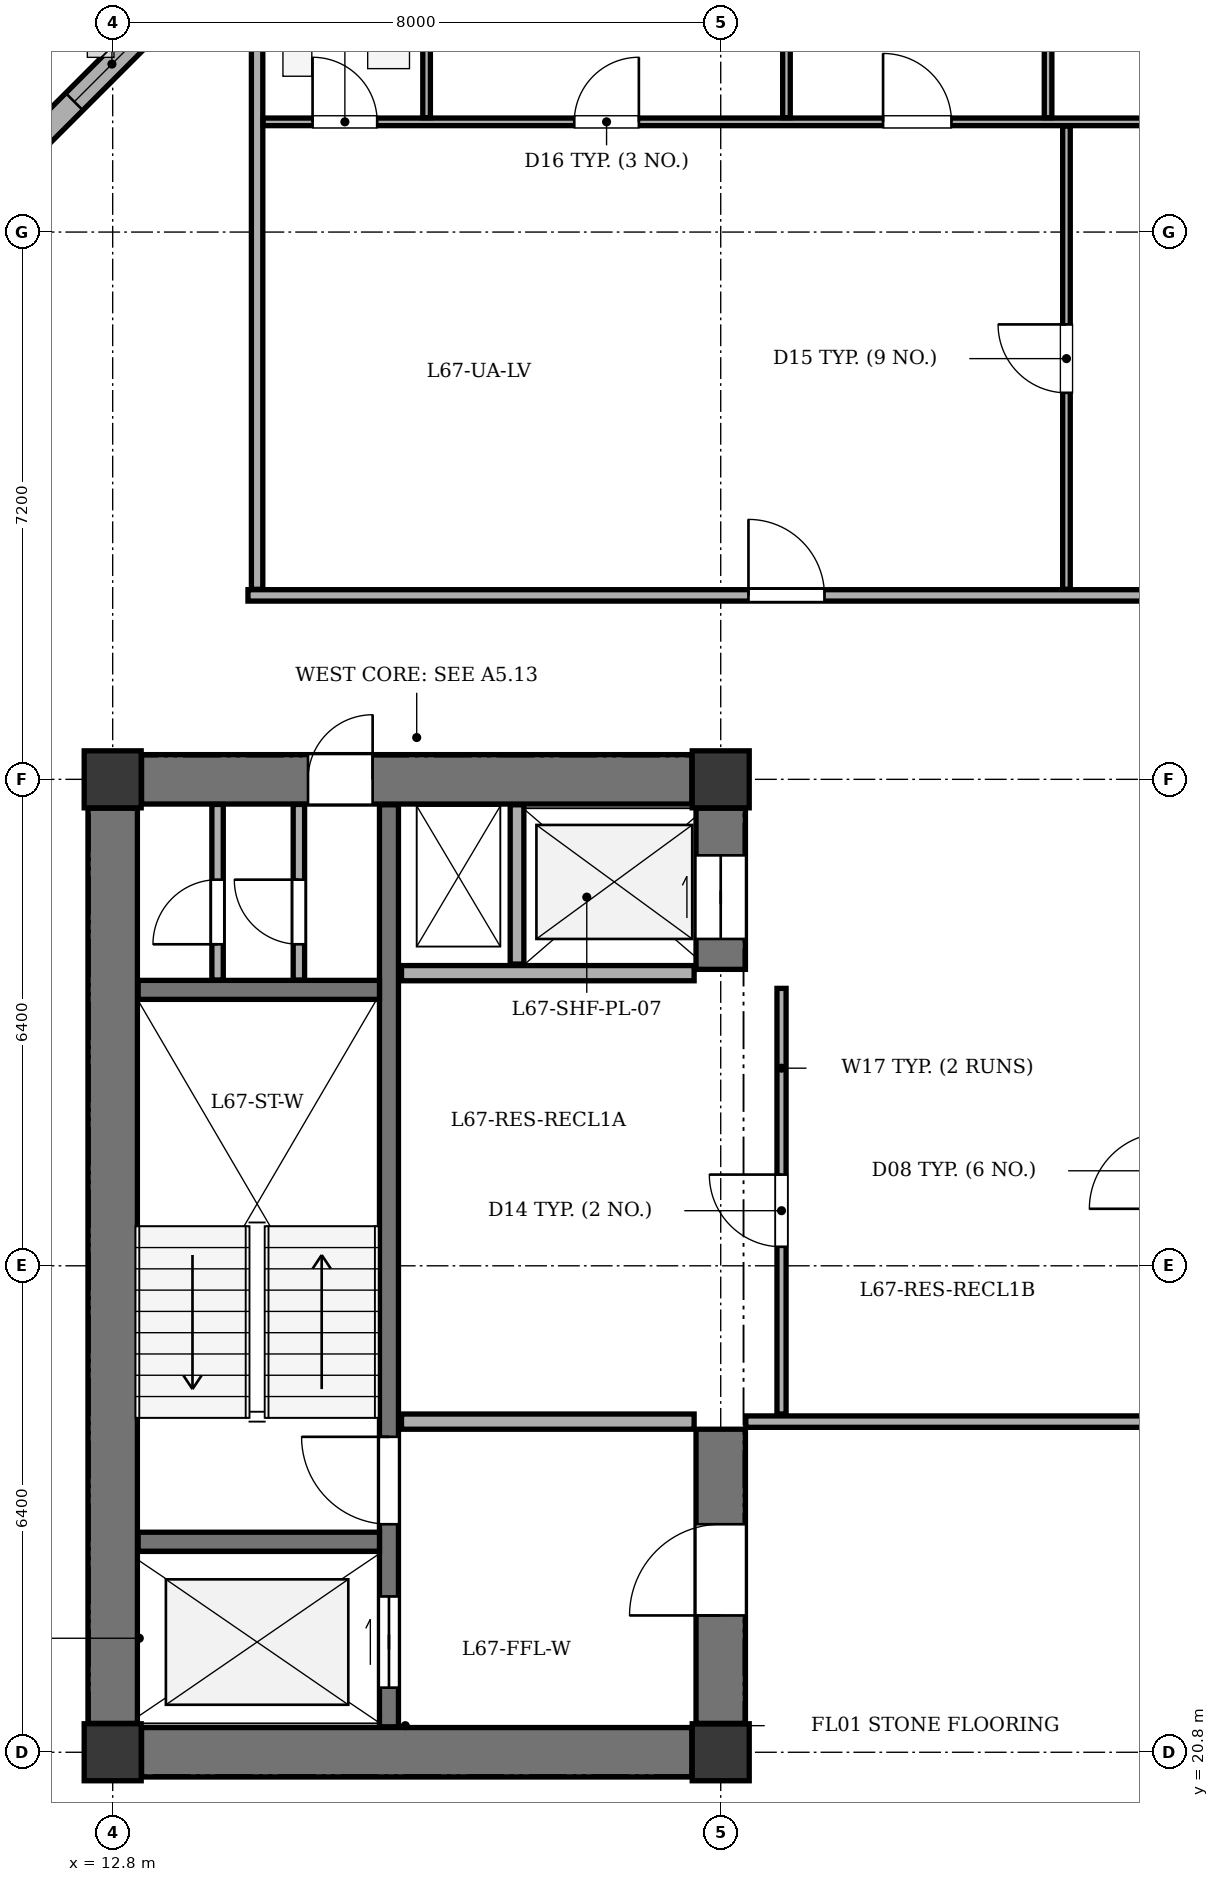
"""IFC4 building model, lengths in metres.
Left out: names, types, materials, properties, quantities, classifications, styles, units other than length and angle.
Written with IfcOpenShell. Run it as: python <this file> out.ifc"""

import sys

from ifc_helpers import new_model, si_unit, direction, frame, frame_2d, origin, origin_2d, place, context, subcontext, project, spatial, rectangle, extrude, element, fill, save


model = new_model("IFC4")
c1 = context("Model", 3, precision=1e-05, world=origin(), true_north=direction((0.0, 1.0)))
c2 = subcontext(c1, "Body", "Model", "MODEL_VIEW")
j1 = project(units=[si_unit("LENGTHUNIT", "METRE"), si_unit("PLANEANGLEUNIT", "RADIAN")], contexts=[c1])
p1 = place(None, origin())
s1 = spatial("IfcSite", under=j1, at=p1, CompositionType="ELEMENT")
p2 = place(p1, origin())
s2 = spatial("IfcBuilding", under=s1, at=p2, CompositionType="ELEMENT")
p3 = place(p2, frame((0.0, 0.0, 255.1)))
s3 = spatial("IfcBuildingStorey", under=s2, at=p3, CompositionType="ELEMENT", Elevation=255.1)
for number, where, z_axis, x_axis in (
    (1, (12.8, 20.8, 0.0), (0.0, 0.0, 1.0), (1.0, 0.0, 0.0)),
    (2, (20.8, 20.8, 0.0), (0.0, 0.0, 1.0), (1.0, 0.0, 0.0)),
    (3, (12.8, 33.6, 0.0), (0.0, 0.0, 1.0), (1.0, 0.0, 0.0)),
    (4, (20.8, 33.6, 0.0), (0.0, 0.0, 1.0), (1.0, 0.0, 0.0)),
):
    element("IfcColumn", number, at=place(p3, frame(where, z_axis=z_axis, x_axis=x_axis)), inside=s3, PredefinedType="COLUMN", context=c2, shape_type="SweptSolid", body=[
        extrude(rectangle(XDim=0.75, YDim=0.75, at=origin_2d()), origin(), (0.0, 0.0, 1.0), 3.4),
    ])
p4 = place(p3, frame((10.88, 41.1, 0.0), z_axis=(0.0, 0.0, 1.0), x_axis=(0.70712937715, 0.707084184501, 0.0)))
e5 = element("IfcWall", 5, at=p4, inside=s3, PredefinedType="STANDARD", context=c2, shape_type="SweptSolid", body=[
    extrude(rectangle(XDim=5.402, YDim=0.32, at=frame_2d((2.701, 0.0))), origin(), (0.0, 0.0, 1.0), 2.725),
])
p5 = place(p4, frame((2.001, 0.0, 0.75)))
e6 = element("IfcOpeningElement", 6, at=p5, cuts=e5, PredefinedType="OPENING", context=c2, shape_type="SweptSolid", body=[
    extrude(rectangle(XDim=1.4, YDim=1.65, at=frame_2d((0.7, 0.825))), frame((0.0, 0.17, 0.0), z_axis=(0.0, -1.0, 0.0), x_axis=(1.0, 0.0, 0.0)), (0.0, 0.0, 1.0), 0.34),
])
p6 = place(p3, frame((12.8, 21.18, 0.0), z_axis=(0.0, 0.0, 1.0), x_axis=(0.0, 1.0, 0.0)))
e7 = element("IfcWall", 7, at=p6, inside=s3, PredefinedType="SHEAR", context=c2, shape_type="SweptSolid", body=[
    extrude(rectangle(XDim=12.04, YDim=0.65, at=frame_2d((6.02, 0.0))), origin(), (0.0, 0.0, 1.0), 3.1),
])
p7 = place(p3, frame((13.18, 20.8, 0.0), z_axis=(0.0, 0.0, 1.0), x_axis=(1.0, 0.0, 0.0)))
e8 = element("IfcWall", 8, at=p7, inside=s3, PredefinedType="SHEAR", context=c2, shape_type="SweptSolid", body=[
    extrude(rectangle(XDim=7.24, YDim=0.65, at=frame_2d((3.62, 0.0))), origin(), (0.0, 0.0, 1.0), 3.1),
])
p8 = place(p3, frame((13.18, 33.6, 0.0), z_axis=(0.0, 0.0, 1.0), x_axis=(1.0, 0.0, 0.0)))
e9 = element("IfcWall", 9, at=p8, inside=s3, PredefinedType="SHEAR", context=c2, shape_type="SweptSolid", body=[
    extrude(rectangle(XDim=7.24, YDim=0.65, at=frame_2d((3.62, 0.0))), origin(), (0.0, 0.0, 1.0), 3.1),
])
p9 = place(p8, frame((2.19, 0.0, 0.0)))
e10 = element("IfcOpeningElement", 10, at=p9, cuts=e9, PredefinedType="OPENING", context=c2, shape_type="SweptSolid", body=[
    extrude(rectangle(XDim=0.85, YDim=2.02, at=frame_2d((0.425, 1.01))), frame((0.0, 0.335, 0.0), z_axis=(0.0, -1.0, 0.0), x_axis=(1.0, 0.0, 0.0)), (0.0, 0.0, 1.0), 0.67),
])
p10 = place(p3, frame((20.8, 21.18, 0.0), z_axis=(0.0, 0.0, 1.0), x_axis=(0.0, 1.0, 0.0)))
e11 = element("IfcWall", 11, at=p10, inside=s3, PredefinedType="SHEAR", context=c2, shape_type="SweptSolid", body=[
    extrude(rectangle(XDim=3.87, YDim=0.65, at=frame_2d((1.935, 0.0))), origin(), (0.0, 0.0, 1.0), 3.1),
])
p11 = place(p10, frame((1.42, 0.0, 0.0)))
e12 = element("IfcOpeningElement", 12, at=p11, cuts=e11, PredefinedType="OPENING", context=c2, shape_type="SweptSolid", body=[
    extrude(rectangle(XDim=1.2, YDim=2.15, at=frame_2d((0.6, 1.075))), frame((0.0, 0.335, 0.0), z_axis=(0.0, -1.0, 0.0), x_axis=(1.0, 0.0, 0.0)), (0.0, 0.0, 1.0), 0.67),
])
p12 = place(p3, frame((20.8, 31.1, 0.0), z_axis=(0.0, 0.0, 1.0), x_axis=(0.0, 1.0, 0.0)))
e13 = element("IfcWall", 13, at=p12, inside=s3, PredefinedType="SHEAR", context=c2, shape_type="SweptSolid", body=[
    extrude(rectangle(XDim=2.12, YDim=0.65, at=frame_2d((1.06, 0.0))), origin(), (0.0, 0.0, 1.0), 3.1),
])
p13 = place(p12, frame((0.4, 0.0, 0.0)))
e14 = element("IfcOpeningElement", 14, at=p13, cuts=e13, PredefinedType="OPENING", context=c2, shape_type="SweptSolid", body=[
    extrude(rectangle(XDim=1.1, YDim=2.1, at=frame_2d((0.55, 1.05))), frame((0.0, 0.335, 0.0), z_axis=(0.0, -1.0, 0.0), x_axis=(1.0, 0.0, 0.0)), (0.0, 0.0, 1.0), 0.67),
])
p14 = place(p3, frame((16.435, 21.135, 0.0), z_axis=(0.0, 0.0, 1.0), x_axis=(0.0, 1.0, 0.0)))
e15 = element("IfcWall", 15, at=p14, inside=s3, PredefinedType="SHEAR", context=c2, shape_type="SweptSolid", body=[
    extrude(rectangle(XDim=12.13, YDim=0.25, at=frame_2d((6.065, 0.0))), origin(), (0.0, 0.0, 1.0), 3.1),
])
p15 = place(p14, frame((0.515, 0.0, 0.0)))
e16 = element("IfcOpeningElement", 16, at=p15, cuts=e15, PredefinedType="OPENING", context=c2, shape_type="SweptSolid", body=[
    extrude(rectangle(XDim=1.2, YDim=2.15, at=frame_2d((0.6, 1.075))), frame((0.0, 0.135, 0.0), z_axis=(0.0, -1.0, 0.0), x_axis=(1.0, 0.0, 0.0)), (0.0, 0.0, 1.0), 0.27),
])
p16 = place(p14, frame((2.665, 0.0, 0.0)))
e17 = element("IfcOpeningElement", 17, at=p16, cuts=e15, PredefinedType="OPENING", context=c2, shape_type="SweptSolid", body=[
    extrude(rectangle(XDim=1.15, YDim=2.15, at=frame_2d((0.575, 1.075))), frame((0.0, 0.135, 0.0), z_axis=(0.0, -1.0, 0.0), x_axis=(1.0, 0.0, 0.0)), (0.0, 0.0, 1.0), 0.27),
])
for number, where, z_axis, x_axis in (
    (18, (13.135, 23.57, 0.0), (0.0, 0.0, 1.0), (1.0, 0.0, 0.0)),
    (19, (13.135, 30.83, 0.0), (0.0, 0.0, 1.0), (1.0, 0.0, 0.0)),
):
    element("IfcWall", number, at=place(p3, frame(where, z_axis=z_axis, x_axis=x_axis)), inside=s3, PredefinedType="SHEAR", context=c2, shape_type="SweptSolid", body=[
        extrude(rectangle(XDim=3.175, YDim=0.25, at=frame_2d((1.587, 0.0))), origin(), (0.0, 0.0, 1.0), 3.1),
    ])
for number, where, z_axis, x_axis in (
    (20, (16.6, 25.15, 0.0), (0.0, 0.0, 1.0), (1.0, 0.0, 0.0)),
    (21, (16.6, 31.05, 0.0), (0.0, 0.0, 1.0), (1.0, 0.0, 0.0)),
):
    element("IfcWall", number, at=place(p3, frame(where, z_axis=z_axis, x_axis=x_axis)), inside=s3, PredefinedType="SOLIDWALL", context=c2, shape_type="SweptSolid", body=[
        extrude(rectangle(XDim=3.85, YDim=0.2, at=frame_2d((1.925, 0.0))), origin(), (0.0, 0.0, 1.0), 3.1),
    ])
p17 = place(p3, frame((18.12, 31.17, 0.0), z_axis=(0.0, 0.0, 1.0), x_axis=(0.0, 1.0, 0.0)))
e22 = element("IfcWall", 22, at=p17, inside=s3, PredefinedType="PARTITIONING", context=c2, shape_type="SweptSolid", body=[
    extrude(rectangle(XDim=2.095, YDim=0.18, at=frame_2d((1.047, 0.0))), origin(), (0.0, 0.0, 1.0), 3.1),
])
p18 = place(p3, frame((14.18, 30.96, 0.0), z_axis=(0.0, 0.0, 1.0), x_axis=(0.0, 1.0, 0.0)))
e23 = element("IfcWall", 23, at=p18, inside=s3, PredefinedType="PARTITIONING", context=c2, shape_type="SweptSolid", body=[
    extrude(rectangle(XDim=2.31, YDim=0.15, at=frame_2d((1.155, 0.0))), origin(), (0.0, 0.0, 1.0), 3.1),
])
p19 = place(p18, frame((0.47, 0.0, 0.0)))
e24 = element("IfcOpeningElement", 24, at=p19, cuts=e23, PredefinedType="OPENING", context=c2, shape_type="SweptSolid", body=[
    extrude(rectangle(XDim=0.85, YDim=2.02, at=frame_2d((0.425, 1.01))), frame((0.0, 0.085, 0.0), z_axis=(0.0, -1.0, 0.0), x_axis=(1.0, 0.0, 0.0)), (0.0, 0.0, 1.0), 0.17),
])
p20 = place(p3, frame((15.25, 30.96, 0.0), z_axis=(0.0, 0.0, 1.0), x_axis=(0.0, 1.0, 0.0)))
e25 = element("IfcWall", 25, at=p20, inside=s3, PredefinedType="PARTITIONING", context=c2, shape_type="SweptSolid", body=[
    extrude(rectangle(XDim=2.31, YDim=0.15, at=frame_2d((1.155, 0.0))), origin(), (0.0, 0.0, 1.0), 3.1),
])
p21 = place(p20, frame((0.47, 0.0, 0.0)))
e26 = element("IfcOpeningElement", 26, at=p21, cuts=e25, PredefinedType="OPENING", context=c2, shape_type="SweptSolid", body=[
    extrude(rectangle(XDim=0.85, YDim=2.02, at=frame_2d((0.425, 1.01))), frame((0.0, 0.085, 0.0), z_axis=(0.0, -1.0, 0.0), x_axis=(1.0, 0.0, 0.0)), (0.0, 0.0, 1.0), 0.17),
])
p22 = place(p3, frame((21.13, 25.15, 0.0), z_axis=(0.0, 0.0, 1.0), x_axis=(1.0, 0.0, 0.0)))
e27 = element("IfcWall", 27, at=p22, inside=s3, PredefinedType="PARTITIONING", context=c2, shape_type="SweptSolid", body=[
    extrude(rectangle(XDim=5.52, YDim=0.15, at=frame_2d((2.76, 0.0))), origin(), (0.0, 0.0, 1.0), 3.1),
])
p23 = place(p3, frame((21.6, 25.25, 0.0), z_axis=(0.0, 0.0, 1.0), x_axis=(0.0, 1.0, 0.0)))
e28 = element("IfcWall", 28, at=p23, inside=s3, PredefinedType="PARTITIONING", context=c2, shape_type="SweptSolid", body=[
    extrude(rectangle(XDim=5.6, YDim=0.12, at=frame_2d((2.8, 0.0))), origin(), (0.0, 0.0, 1.0), 3.1),
])
p24 = place(p23, frame((2.2, 0.0, 0.0)))
e29 = element("IfcOpeningElement", 29, at=p24, cuts=e28, PredefinedType="OPENING", context=c2, shape_type="SweptSolid", body=[
    extrude(rectangle(XDim=0.95, YDim=2.1, at=frame_2d((0.475, 1.05))), frame((0.0, 0.07, 0.0), z_axis=(0.0, -1.0, 0.0), x_axis=(1.0, 0.0, 0.0)), (0.0, 0.0, 1.0), 0.14),
])
p25 = place(p3, frame((14.58, 36.02, 0.0), z_axis=(0.0, 0.0, 1.0), x_axis=(1.0, 0.0, 0.0)))
e30 = element("IfcWall", 30, at=p25, inside=s3, PredefinedType="PARTITIONING", context=c2, shape_type="SweptSolid", body=[
    extrude(rectangle(XDim=30.52, YDim=0.15, at=frame_2d((15.26, 0.0))), origin(), (0.0, 0.0, 1.0), 3.1),
])
p26 = place(p25, frame((6.585, 0.0, 0.0)))
e31 = element("IfcOpeningElement", 31, at=p26, cuts=e30, PredefinedType="OPENING", context=c2, shape_type="SweptSolid", body=[
    extrude(rectangle(XDim=1.0, YDim=2.1, at=frame_2d((0.5, 1.05))), frame((0.0, 0.085, 0.0), z_axis=(0.0, -1.0, 0.0), x_axis=(1.0, 0.0, 0.0)), (0.0, 0.0, 1.0), 0.17),
])
p27 = place(p25, frame((21.724, 0.0, 0.0)))
e32 = element("IfcOpeningElement", 32, at=p27, cuts=e30, PredefinedType="OPENING", context=c2, shape_type="SweptSolid", body=[
    extrude(rectangle(XDim=1.0, YDim=2.1, at=frame_2d((0.5, 1.05))), frame((0.0, 0.085, 0.0), z_axis=(0.0, -1.0, 0.0), x_axis=(1.0, 0.0, 0.0)), (0.0, 0.0, 1.0), 0.17),
])
p28 = place(p3, frame((14.7, 36.1, 0.0), z_axis=(0.0, 0.0, 1.0), x_axis=(0.0, 1.0, 0.0)))
e33 = element("IfcWall", 33, at=p28, inside=s3, PredefinedType="PARTITIONING", context=c2, shape_type="SweptSolid", body=[
    extrude(rectangle(XDim=8.655, YDim=0.15, at=frame_2d((4.327, 0.0))), origin(), (0.0, 0.0, 1.0), 3.1),
])
p29 = place(p3, frame((14.78, 42.25, 0.0), z_axis=(0.0, 0.0, 1.0), x_axis=(1.0, 0.0, 0.0)))
e34 = element("IfcWall", 34, at=p29, inside=s3, PredefinedType="PARTITIONING", context=c2, shape_type="SweptSolid", body=[
    extrude(rectangle(XDim=13.889, YDim=0.1, at=frame_2d((6.944, 0.0))), origin(), (0.0, 0.0, 1.0), 3.1),
])
p30 = place(p29, frame((0.65, 0.0, 0.0)))
e35 = element("IfcOpeningElement", 35, at=p30, cuts=e34, PredefinedType="OPENING", context=c2, shape_type="SweptSolid", body=[
    extrude(rectangle(XDim=0.85, YDim=2.05, at=frame_2d((0.425, 1.025))), frame((0.0, 0.06, 0.0), z_axis=(0.0, -1.0, 0.0), x_axis=(1.0, 0.0, 0.0)), (0.0, 0.0, 1.0), 0.12),
])
p31 = place(p29, frame((4.093, 0.0, 0.0)))
e36 = element("IfcOpeningElement", 36, at=p31, cuts=e34, PredefinedType="OPENING", context=c2, shape_type="SweptSolid", body=[
    extrude(rectangle(XDim=0.85, YDim=2.05, at=frame_2d((0.425, 1.025))), frame((0.0, 0.06, 0.0), z_axis=(0.0, -1.0, 0.0), x_axis=(1.0, 0.0, 0.0)), (0.0, 0.0, 1.0), 0.12),
])
p32 = place(p29, frame((8.156, 0.0, 0.0)))
e37 = element("IfcOpeningElement", 37, at=p32, cuts=e34, PredefinedType="OPENING", context=c2, shape_type="SweptSolid", body=[
    extrude(rectangle(XDim=0.9, YDim=2.05, at=frame_2d((0.45, 1.025))), frame((0.0, 0.06, 0.0), z_axis=(0.0, -1.0, 0.0), x_axis=(1.0, 0.0, 0.0)), (0.0, 0.0, 1.0), 0.12),
])
p33 = place(p29, frame((11.598, 0.0, 0.0)))
e38 = element("IfcOpeningElement", 38, at=p33, cuts=e34, PredefinedType="OPENING", context=c2, shape_type="SweptSolid", body=[
    extrude(rectangle(XDim=0.9, YDim=2.05, at=frame_2d((0.45, 1.025))), frame((0.0, 0.06, 0.0), z_axis=(0.0, -1.0, 0.0), x_axis=(1.0, 0.0, 0.0)), (0.0, 0.0, 1.0), 0.12),
])
p34 = place(p3, frame((25.349, 36.1, 0.0), z_axis=(0.0, 0.0, 1.0), x_axis=(0.0, 1.0, 0.0)))
e39 = element("IfcWall", 39, at=p34, inside=s3, PredefinedType="PARTITIONING", context=c2, shape_type="SweptSolid", body=[
    extrude(rectangle(XDim=6.095, YDim=0.1, at=frame_2d((3.047, 0.0))), origin(), (0.0, 0.0, 1.0), 3.1),
])
p35 = place(p34, frame((2.585, 0.0, 0.0)))
e40 = element("IfcOpeningElement", 40, at=p35, cuts=e39, PredefinedType="OPENING", context=c2, shape_type="SweptSolid", body=[
    extrude(rectangle(XDim=0.9, YDim=2.05, at=frame_2d((0.45, 1.025))), frame((0.0, 0.06, 0.0), z_axis=(0.0, -1.0, 0.0), x_axis=(1.0, 0.0, 0.0)), (0.0, 0.0, 1.0), 0.12),
])
for number, where, z_axis, x_axis in (
    (41, (16.93, 42.305, 0.0), (0.0, 0.0, 1.0), (0.0, 1.0, 0.0)),
    (42, (21.665, 42.305, 0.0), (0.0, 0.0, 1.0), (0.0, 1.0, 0.0)),
    (43, (25.107, 42.305, 0.0), (0.0, 0.0, 1.0), (0.0, 1.0, 0.0)),
):
    element("IfcWall", number, at=place(p3, frame(where, z_axis=z_axis, x_axis=x_axis)), inside=s3, PredefinedType="PARTITIONING", context=c2, shape_type="SweptSolid", body=[
        extrude(rectangle(XDim=2.45, YDim=0.1, at=frame_2d((1.225, 0.0))), origin(), (0.0, 0.0, 1.0), 3.1),
    ])
p36 = place(p5, origin())
e44 = element("IfcWindow", 44, at=p36, inside=s3, PartitioningType="SINGLE_PANEL", PredefinedType="WINDOW", context=c2, shape_type="SweptSolid", body=[
    extrude(rectangle(XDim=1.4, YDim=1.65, at=frame_2d((0.7, 0.825))), frame((0.0, -0.01, 0.0), z_axis=(0.0, -1.0, 0.0), x_axis=(1.0, 0.0, 0.0)), (0.0, 0.0, 1.0), 0.06),
])
fill(e6, e44)
p37 = place(p9, origin())
e45 = element("IfcDoor", 45, at=p37, inside=s3, OperationType="SINGLE_SWING_RIGHT", PredefinedType="DOOR", context=c2, shape_type="SweptSolid", body=[
    extrude(rectangle(XDim=0.85, YDim=2.02, at=frame_2d((0.425, 1.01))), frame((0.0, 0.025, 0.0), z_axis=(0.0, -1.0, 0.0), x_axis=(1.0, 0.0, 0.0)), (0.0, 0.0, 1.0), 0.05),
])
fill(e10, e45)
p38 = place(p11, origin())
e46 = element("IfcDoor", 46, at=p38, inside=s3, OperationType="SINGLE_SWING_LEFT", PredefinedType="DOOR", context=c2, shape_type="SweptSolid", body=[
    extrude(rectangle(XDim=1.2, YDim=2.15, at=frame_2d((0.6, 1.075))), frame((0.0, 0.025, 0.0), z_axis=(0.0, -1.0, 0.0), x_axis=(1.0, 0.0, 0.0)), (0.0, 0.0, 1.0), 0.05),
])
fill(e12, e46)
p39 = place(p13, origin())
e47 = element("IfcDoor", 47, at=p39, inside=s3, OperationType="DOUBLE_DOOR_SLIDING", PredefinedType="DOOR", context=c2, shape_type="SweptSolid", body=[
    extrude(rectangle(XDim=1.1, YDim=2.1, at=frame_2d((0.55, 1.05))), frame((0.0, 0.025, 0.0), z_axis=(0.0, -1.0, 0.0), x_axis=(1.0, 0.0, 0.0)), (0.0, 0.0, 1.0), 0.05),
])
fill(e14, e47)
p40 = place(p15, origin())
e48 = element("IfcDoor", 48, at=p40, inside=s3, OperationType="DOUBLE_DOOR_SLIDING", PredefinedType="DOOR", context=c2, shape_type="SweptSolid", body=[
    extrude(rectangle(XDim=1.2, YDim=2.15, at=frame_2d((0.6, 1.075))), frame((0.0, 0.025, 0.0), z_axis=(0.0, -1.0, 0.0), x_axis=(1.0, 0.0, 0.0)), (0.0, 0.0, 1.0), 0.05),
])
fill(e16, e48)
p41 = place(p16, origin())
e49 = element("IfcDoor", 49, at=p41, inside=s3, OperationType="SINGLE_SWING_RIGHT", PredefinedType="DOOR", context=c2, shape_type="SweptSolid", body=[
    extrude(rectangle(XDim=1.15, YDim=2.15, at=frame_2d((0.575, 1.075))), frame((0.0, 0.025, 0.0), z_axis=(0.0, -1.0, 0.0), x_axis=(1.0, 0.0, 0.0)), (0.0, 0.0, 1.0), 0.05),
])
fill(e17, e49)
p42 = place(p19, origin())
e50 = element("IfcDoor", 50, at=p42, inside=s3, OperationType="SINGLE_SWING_LEFT", PredefinedType="DOOR", context=c2, shape_type="SweptSolid", body=[
    extrude(rectangle(XDim=0.85, YDim=2.02, at=frame_2d((0.425, 1.01))), frame((0.0, 0.025, 0.0), z_axis=(0.0, -1.0, 0.0), x_axis=(1.0, 0.0, 0.0)), (0.0, 0.0, 1.0), 0.05),
])
fill(e24, e50)
p43 = place(p21, origin())
e51 = element("IfcDoor", 51, at=p43, inside=s3, OperationType="SINGLE_SWING_RIGHT", PredefinedType="DOOR", context=c2, shape_type="SweptSolid", body=[
    extrude(rectangle(XDim=0.85, YDim=2.02, at=frame_2d((0.425, 1.01))), frame((0.0, 0.025, 0.0), z_axis=(0.0, -1.0, 0.0), x_axis=(1.0, 0.0, 0.0)), (0.0, 0.0, 1.0), 0.05),
])
fill(e26, e51)
p44 = place(p24, origin())
e52 = element("IfcDoor", 52, at=p44, inside=s3, OperationType="SINGLE_SWING_RIGHT", PredefinedType="DOOR", context=c2, shape_type="SweptSolid", body=[
    extrude(rectangle(XDim=0.95, YDim=2.1, at=frame_2d((0.475, 1.05))), frame((0.0, 0.025, 0.0), z_axis=(0.0, -1.0, 0.0), x_axis=(1.0, 0.0, 0.0)), (0.0, 0.0, 1.0), 0.05),
])
fill(e29, e52)
p45 = place(p26, origin())
e53 = element("IfcDoor", 53, at=p45, inside=s3, OperationType="SINGLE_SWING_LEFT", PredefinedType="DOOR", context=c2, shape_type="SweptSolid", body=[
    extrude(rectangle(XDim=1.0, YDim=2.1, at=frame_2d((0.5, 1.05))), frame((0.0, 0.025, 0.0), z_axis=(0.0, -1.0, 0.0), x_axis=(1.0, 0.0, 0.0)), (0.0, 0.0, 1.0), 0.05),
])
fill(e31, e53)
p46 = place(p35, origin())
e54 = element("IfcDoor", 54, at=p46, inside=s3, OperationType="SINGLE_SWING_RIGHT", PredefinedType="DOOR", context=c2, shape_type="SweptSolid", body=[
    extrude(rectangle(XDim=0.9, YDim=2.05, at=frame_2d((0.45, 1.025))), frame((0.0, 0.025, 0.0), z_axis=(0.0, -1.0, 0.0), x_axis=(1.0, 0.0, 0.0)), (0.0, 0.0, 1.0), 0.05),
])
fill(e40, e54)
p47 = place(p30, origin())
e55 = element("IfcDoor", 55, at=p47, inside=s3, OperationType="SINGLE_SWING_LEFT", PredefinedType="DOOR", context=c2, shape_type="SweptSolid", body=[
    extrude(rectangle(XDim=0.85, YDim=2.05, at=frame_2d((0.425, 1.025))), frame((0.0, 0.025, 0.0), z_axis=(0.0, -1.0, 0.0), x_axis=(1.0, 0.0, 0.0)), (0.0, 0.0, 1.0), 0.05),
])
fill(e35, e55)
p48 = place(p31, origin())
e56 = element("IfcDoor", 56, at=p48, inside=s3, OperationType="SINGLE_SWING_RIGHT", PredefinedType="DOOR", context=c2, shape_type="SweptSolid", body=[
    extrude(rectangle(XDim=0.85, YDim=2.05, at=frame_2d((0.425, 1.025))), frame((0.0, 0.025, 0.0), z_axis=(0.0, -1.0, 0.0), x_axis=(1.0, 0.0, 0.0)), (0.0, 0.0, 1.0), 0.05),
])
fill(e36, e56)
p49 = place(p32, origin())
e57 = element("IfcDoor", 57, at=p49, inside=s3, OperationType="SINGLE_SWING_LEFT", PredefinedType="DOOR", context=c2, shape_type="SweptSolid", body=[
    extrude(rectangle(XDim=0.9, YDim=2.05, at=frame_2d((0.45, 1.025))), frame((0.0, 0.025, 0.0), z_axis=(0.0, -1.0, 0.0), x_axis=(1.0, 0.0, 0.0)), (0.0, 0.0, 1.0), 0.05),
])
fill(e37, e57)
save(model, sys.argv[1])
